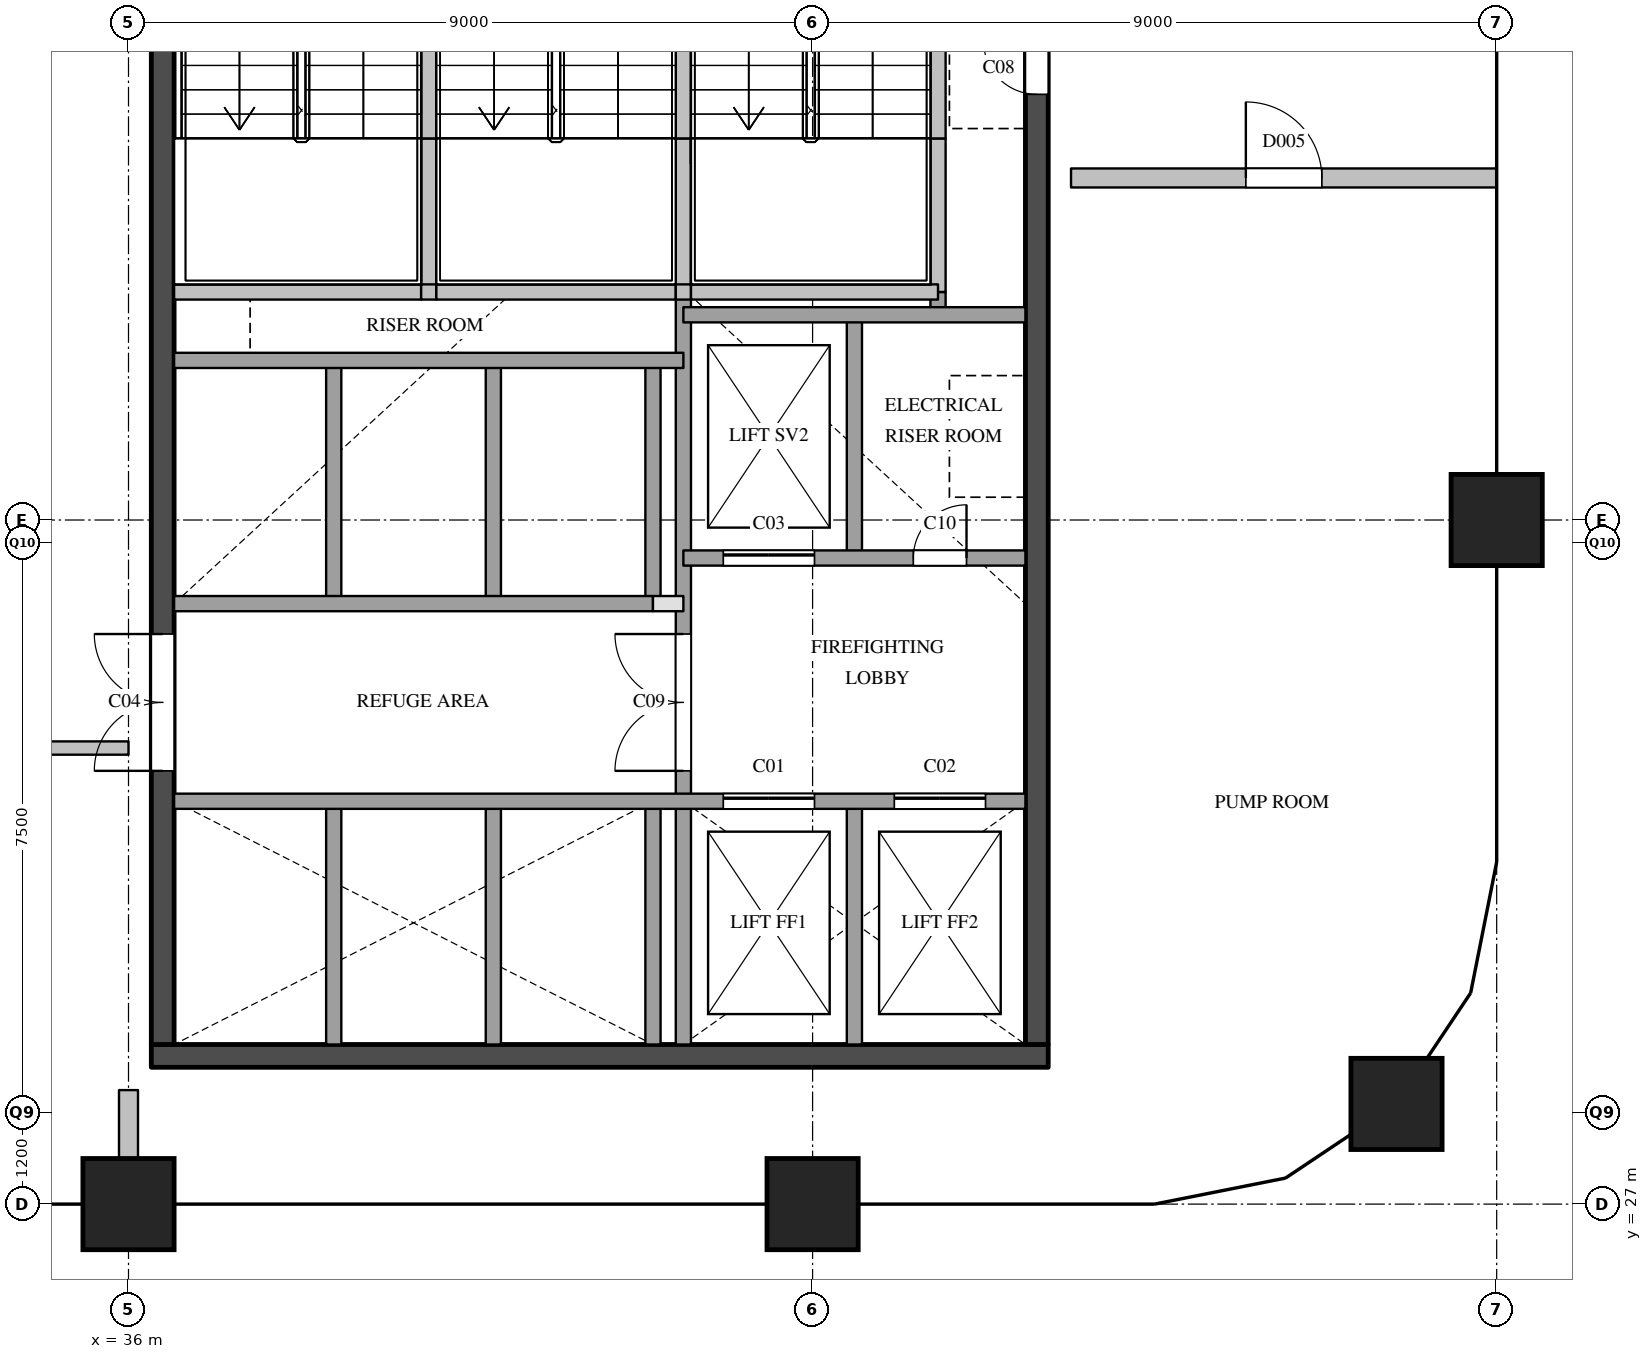
"""IFC4 building model, lengths in metres.
Left out: names, types, materials, properties, quantities, classifications, styles, units other than length and angle.
Written with IfcOpenShell. Run it as: python <this file> out.ifc"""

import sys

from ifc_helpers import new_model, si_unit, direction, frame, frame_2d, origin, origin_2d, place, context, subcontext, project, spatial, rectangle, extrude, element, fill, save


model = new_model("IFC4")
c1 = context("Model", 3, precision=1e-05, world=origin(), true_north=direction((0.0, 1.0)))
c2 = subcontext(c1, "Body", "Model", "MODEL_VIEW")
j1 = project(units=[si_unit("LENGTHUNIT", "METRE"), si_unit("PLANEANGLEUNIT", "RADIAN")], contexts=[c1])
p1 = place(None, origin())
s1 = spatial("IfcSite", under=j1, at=p1, CompositionType="ELEMENT")
p2 = place(p1, origin())
s2 = spatial("IfcBuilding", under=s1, at=p2, CompositionType="ELEMENT")
p3 = place(p2, frame((0.0, 0.0, 295.2)))
s3 = spatial("IfcBuildingStorey", under=s2, at=p3, CompositionType="ELEMENT", Elevation=295.2)
for number, where, z_axis, x_axis in (
    (1, (36.0, 27.0, 0.0), (0.0, 0.0, 1.0), (1.0, 0.0, 0.0)),
    (2, (45.0, 27.0, 0.0), (0.0, 0.0, 1.0), (1.0, 0.0, 0.0)),
    (3, (52.682, 28.318, 0.0), (0.0, 0.0, 1.0), (1.0, 0.0, 0.0)),
    (4, (54.0, 36.0, 0.0), (0.0, 0.0, 1.0), (1.0, 0.0, 0.0)),
):
    element("IfcColumn", number, at=place(p3, frame(where, z_axis=z_axis, x_axis=x_axis)), inside=s3, PredefinedType="COLUMN", context=c2, shape_type="SweptSolid", body=[
        extrude(rectangle(XDim=1.2, YDim=1.2, at=origin_2d()), origin(), (0.0, 0.0, 1.0), 6.0),
    ])
p4 = place(p3, frame((36.3, 28.95, 0.0), z_axis=(0.0, 0.0, 1.0), x_axis=(1.0, 0.0, 0.0)))
e5 = element("IfcWall", 5, at=p4, inside=s3, PredefinedType="SHEAR", context=c2, shape_type="SweptSolid", body=[
    extrude(rectangle(XDim=11.8, YDim=0.3, at=frame_2d((5.9, 0.0))), origin(), (0.0, 0.0, 1.0), 5.7),
])
p5 = place(p3, frame((36.45, 29.1, 0.0), z_axis=(0.0, 0.0, 1.0), x_axis=(0.0, 1.0, 0.0)))
e6 = element("IfcWall", 6, at=p5, inside=s3, PredefinedType="SHEAR", context=c2, shape_type="SweptSolid", body=[
    extrude(rectangle(XDim=20.3, YDim=0.3, at=frame_2d((10.15, 0.0))), origin(), (0.0, 0.0, 1.0), 5.7),
])
p6 = place(p5, frame((3.6, 0.0, 0.0)))
e7 = element("IfcOpeningElement", 7, at=p6, cuts=e6, PredefinedType="OPENING", context=c2, shape_type="SweptSolid", body=[
    extrude(rectangle(XDim=1.8, YDim=2.1, at=frame_2d((0.9, 1.05))), frame((0.0, 0.16, 0.0), z_axis=(0.0, -1.0, 0.0), x_axis=(1.0, 0.0, 0.0)), (0.0, 0.0, 1.0), 0.32),
])
p7 = place(p5, frame((16.4, 0.0, 0.0)))
e8 = element("IfcOpeningElement", 8, at=p7, cuts=e6, PredefinedType="OPENING", context=c2, shape_type="SweptSolid", body=[
    extrude(rectangle(XDim=1.0, YDim=2.1, at=frame_2d((0.5, 1.05))), frame((0.0, 0.16, 0.0), z_axis=(0.0, -1.0, 0.0), x_axis=(1.0, 0.0, 0.0)), (0.0, 0.0, 1.0), 0.32),
])
p8 = place(p3, frame((47.95, 29.1, 0.0), z_axis=(0.0, 0.0, 1.0), x_axis=(0.0, 1.0, 0.0)))
e9 = element("IfcWall", 9, at=p8, inside=s3, PredefinedType="SHEAR", context=c2, shape_type="SweptSolid", body=[
    extrude(rectangle(XDim=20.3, YDim=0.3, at=frame_2d((10.15, 0.0))), origin(), (0.0, 0.0, 1.0), 5.7),
])
p9 = place(p8, frame((12.5, 0.0, 0.0)))
e10 = element("IfcOpeningElement", 10, at=p9, cuts=e9, PredefinedType="OPENING", context=c2, shape_type="SweptSolid", body=[
    extrude(rectangle(XDim=0.7, YDim=2.1, at=frame_2d((0.35, 1.05))), frame((0.0, 0.16, 0.0), z_axis=(0.0, -1.0, 0.0), x_axis=(1.0, 0.0, 0.0)), (0.0, 0.0, 1.0), 0.32),
])
p10 = place(p3, frame((38.7, 29.1, 0.0), z_axis=(0.0, 0.0, 1.0), x_axis=(0.0, 1.0, 0.0)))
e11 = element("IfcWall", 11, at=p10, inside=s3, PredefinedType="SOLIDWALL", context=c2, shape_type="SweptSolid", body=[
    extrude(rectangle(XDim=3.2, YDim=0.2, at=frame_2d((1.6, 0.0))), origin(), (0.0, 0.0, 1.0), 5.7),
])
p11 = place(p3, frame((38.7, 34.9, 0.0), z_axis=(0.0, 0.0, 1.0), x_axis=(0.0, 1.0, 0.0)))
e12 = element("IfcWall", 12, at=p11, inside=s3, PredefinedType="SOLIDWALL", context=c2, shape_type="SweptSolid", body=[
    extrude(rectangle(XDim=3.2, YDim=0.2, at=frame_2d((1.6, 0.0))), origin(), (0.0, 0.0, 1.0), 5.7),
])
p12 = place(p3, frame((39.95, 39.0, 0.0), z_axis=(0.0, 0.0, 1.0), x_axis=(0.0, 1.0, 0.0)))
e13 = element("IfcWall", 13, at=p12, inside=s3, PredefinedType="SOLIDWALL", context=c2, shape_type="SweptSolid", body=[
    extrude(rectangle(XDim=2.02, YDim=0.2, at=frame_2d((1.01, 0.0))), origin(), (0.0, 0.0, 1.0), 5.7),
])
p13 = place(p3, frame((39.95, 41.02, 0.0), z_axis=(0.0, 0.0, 1.0), x_axis=(0.0, 1.0, 0.0)))
e14 = element("IfcWall", 14, at=p13, inside=s3, PredefinedType="SOLIDWALL", context=c2, shape_type="SweptSolid", body=[
    extrude(rectangle(XDim=2.56, YDim=0.2, at=frame_2d((1.28, 0.0))), origin(), (0.0, 0.0, 1.0), 5.7),
])
p14 = place(p3, frame((40.8, 29.1, 0.0), z_axis=(0.0, 0.0, 1.0), x_axis=(0.0, 1.0, 0.0)))
e15 = element("IfcWall", 15, at=p14, inside=s3, PredefinedType="SOLIDWALL", context=c2, shape_type="SweptSolid", body=[
    extrude(rectangle(XDim=3.2, YDim=0.2, at=frame_2d((1.6, 0.0))), origin(), (0.0, 0.0, 1.0), 5.7),
])
p15 = place(p3, frame((40.8, 34.9, 0.0), z_axis=(0.0, 0.0, 1.0), x_axis=(0.0, 1.0, 0.0)))
e16 = element("IfcWall", 16, at=p15, inside=s3, PredefinedType="SOLIDWALL", context=c2, shape_type="SweptSolid", body=[
    extrude(rectangle(XDim=3.2, YDim=0.2, at=frame_2d((1.6, 0.0))), origin(), (0.0, 0.0, 1.0), 5.7),
])
p16 = place(p3, frame((42.9, 29.1, 0.0), z_axis=(0.0, 0.0, 1.0), x_axis=(0.0, 1.0, 0.0)))
e17 = element("IfcWall", 17, at=p16, inside=s3, PredefinedType="SOLIDWALL", context=c2, shape_type="SweptSolid", body=[
    extrude(rectangle(XDim=3.2, YDim=0.2, at=frame_2d((1.6, 0.0))), origin(), (0.0, 0.0, 1.0), 5.7),
])
p17 = place(p3, frame((42.9, 34.9, 0.0), z_axis=(0.0, 0.0, 1.0), x_axis=(0.0, 1.0, 0.0)))
e18 = element("IfcWall", 18, at=p17, inside=s3, PredefinedType="SOLIDWALL", context=c2, shape_type="SweptSolid", body=[
    extrude(rectangle(XDim=3.2, YDim=0.2, at=frame_2d((1.6, 0.0))), origin(), (0.0, 0.0, 1.0), 5.7),
])
p18 = place(p3, frame((43.3, 29.1, 0.0), z_axis=(0.0, 0.0, 1.0), x_axis=(0.0, 1.0, 0.0)))
e19 = element("IfcWall", 19, at=p18, inside=s3, PredefinedType="SOLIDWALL", context=c2, shape_type="SweptSolid", body=[
    extrude(rectangle(XDim=9.9, YDim=0.2, at=frame_2d((4.95, 0.0))), origin(), (0.0, 0.0, 1.0), 5.7),
])
p19 = place(p18, frame((3.6, 0.0, 0.0)))
e20 = element("IfcOpeningElement", 20, at=p19, cuts=e19, PredefinedType="OPENING", context=c2, shape_type="SweptSolid", body=[
    extrude(rectangle(XDim=1.8, YDim=2.1, at=frame_2d((0.9, 1.05))), frame((0.0, 0.11, 0.0), z_axis=(0.0, -1.0, 0.0), x_axis=(1.0, 0.0, 0.0)), (0.0, 0.0, 1.0), 0.22),
])
p20 = place(p3, frame((43.3, 39.0, 0.0), z_axis=(0.0, 0.0, 1.0), x_axis=(0.0, 1.0, 0.0)))
e21 = element("IfcWall", 21, at=p20, inside=s3, PredefinedType="SOLIDWALL", context=c2, shape_type="SweptSolid", body=[
    extrude(rectangle(XDim=2.02, YDim=0.2, at=frame_2d((1.01, 0.0))), origin(), (0.0, 0.0, 1.0), 5.7),
])
p21 = place(p3, frame((43.3, 41.02, 0.0), z_axis=(0.0, 0.0, 1.0), x_axis=(0.0, 1.0, 0.0)))
e22 = element("IfcWall", 22, at=p21, inside=s3, PredefinedType="SOLIDWALL", context=c2, shape_type="SweptSolid", body=[
    extrude(rectangle(XDim=2.56, YDim=0.2, at=frame_2d((1.28, 0.0))), origin(), (0.0, 0.0, 1.0), 5.7),
])
for number, where, z_axis, x_axis in (
    (23, (45.55, 29.1, 0.0), (0.0, 0.0, 1.0), (0.0, 1.0, 0.0)),
    (24, (45.55, 35.5, 0.0), (0.0, 0.0, 1.0), (0.0, 1.0, 0.0)),
):
    element("IfcWall", number, at=place(p3, frame(where, z_axis=z_axis, x_axis=x_axis)), inside=s3, PredefinedType="SOLIDWALL", context=c2, shape_type="SweptSolid", body=[
        extrude(rectangle(XDim=3.2, YDim=0.2, at=frame_2d((1.6, 0.0))), origin(), (0.0, 0.0, 1.0), 5.7),
    ])
p22 = place(p3, frame((46.65, 38.7, 0.0), z_axis=(0.0, 0.0, 1.0), x_axis=(0.0, 1.0, 0.0)))
e25 = element("IfcWall", 25, at=p22, inside=s3, PredefinedType="SOLIDWALL", context=c2, shape_type="SweptSolid", body=[
    extrude(rectangle(XDim=0.3, YDim=0.2, at=frame_2d((0.15, 0.0))), origin(), (0.0, 0.0, 1.0), 5.7),
])
p23 = place(p3, frame((46.65, 39.0, 0.0), z_axis=(0.0, 0.0, 1.0), x_axis=(0.0, 1.0, 0.0)))
e26 = element("IfcWall", 26, at=p23, inside=s3, PredefinedType="SOLIDWALL", context=c2, shape_type="SweptSolid", body=[
    extrude(rectangle(XDim=2.02, YDim=0.2, at=frame_2d((1.01, 0.0))), origin(), (0.0, 0.0, 1.0), 5.7),
])
p24 = place(p3, frame((46.65, 41.02, 0.0), z_axis=(0.0, 0.0, 1.0), x_axis=(0.0, 1.0, 0.0)))
e27 = element("IfcWall", 27, at=p24, inside=s3, PredefinedType="SOLIDWALL", context=c2, shape_type="SweptSolid", body=[
    extrude(rectangle(XDim=2.56, YDim=0.2, at=frame_2d((1.28, 0.0))), origin(), (0.0, 0.0, 1.0), 5.7),
])
p25 = place(p3, frame((36.6, 32.3, 0.0), z_axis=(0.0, 0.0, 1.0), x_axis=(1.0, 0.0, 0.0)))
e28 = element("IfcWall", 28, at=p25, inside=s3, PredefinedType="SOLIDWALL", context=c2, shape_type="SweptSolid", body=[
    extrude(rectangle(XDim=11.2, YDim=0.2, at=frame_2d((5.6, 0.0))), origin(), (0.0, 0.0, 1.0), 5.7),
])
p26 = place(p25, frame((7.225, 0.0, 0.0)))
e29 = element("IfcOpeningElement", 29, at=p26, cuts=e28, PredefinedType="OPENING", context=c2, shape_type="SweptSolid", body=[
    extrude(rectangle(XDim=1.2, YDim=2.1, at=frame_2d((0.6, 1.05))), frame((0.0, 0.11, 0.0), z_axis=(0.0, -1.0, 0.0), x_axis=(1.0, 0.0, 0.0)), (0.0, 0.0, 1.0), 0.22),
])
p27 = place(p25, frame((9.475, 0.0, 0.0)))
e30 = element("IfcOpeningElement", 30, at=p27, cuts=e28, PredefinedType="OPENING", context=c2, shape_type="SweptSolid", body=[
    extrude(rectangle(XDim=1.2, YDim=2.1, at=frame_2d((0.6, 1.05))), frame((0.0, 0.11, 0.0), z_axis=(0.0, -1.0, 0.0), x_axis=(1.0, 0.0, 0.0)), (0.0, 0.0, 1.0), 0.22),
])
p28 = place(p3, frame((42.9, 34.9, 0.0), z_axis=(0.0, 0.0, 1.0), x_axis=(1.0, 0.0, 0.0)))
e31 = element("IfcWall", 31, at=p28, inside=s3, PredefinedType="PARTITIONING", context=c2, shape_type="SweptSolid", body=[
    extrude(rectangle(XDim=0.4, YDim=0.2, at=frame_2d((0.2, 0.0))), origin(), (0.0, 0.0, 1.0), 5.7),
])
p29 = place(p3, frame((36.6, 34.9, 0.0), z_axis=(0.0, 0.0, 1.0), x_axis=(1.0, 0.0, 0.0)))
e32 = element("IfcWall", 32, at=p29, inside=s3, PredefinedType="SOLIDWALL", context=c2, shape_type="SweptSolid", body=[
    extrude(rectangle(XDim=6.3, YDim=0.2, at=frame_2d((3.15, 0.0))), origin(), (0.0, 0.0, 1.0), 5.7),
])
p30 = place(p3, frame((43.3, 35.5, 0.0), z_axis=(0.0, 0.0, 1.0), x_axis=(1.0, 0.0, 0.0)))
e33 = element("IfcWall", 33, at=p30, inside=s3, PredefinedType="SOLIDWALL", context=c2, shape_type="SweptSolid", body=[
    extrude(rectangle(XDim=4.5, YDim=0.2, at=frame_2d((2.25, 0.0))), origin(), (0.0, 0.0, 1.0), 5.7),
])
p31 = place(p30, frame((0.525, 0.0, 0.0)))
e34 = element("IfcOpeningElement", 34, at=p31, cuts=e33, PredefinedType="OPENING", context=c2, shape_type="SweptSolid", body=[
    extrude(rectangle(XDim=1.2, YDim=2.1, at=frame_2d((0.6, 1.05))), frame((0.0, 0.11, 0.0), z_axis=(0.0, -1.0, 0.0), x_axis=(1.0, 0.0, 0.0)), (0.0, 0.0, 1.0), 0.22),
])
p32 = place(p30, frame((3.025, 0.0, 0.0)))
e35 = element("IfcOpeningElement", 35, at=p32, cuts=e33, PredefinedType="OPENING", context=c2, shape_type="SweptSolid", body=[
    extrude(rectangle(XDim=0.7, YDim=2.1, at=frame_2d((0.35, 1.05))), frame((0.0, 0.11, 0.0), z_axis=(0.0, -1.0, 0.0), x_axis=(1.0, 0.0, 0.0)), (0.0, 0.0, 1.0), 0.22),
])
p33 = place(p3, frame((36.6, 38.1, 0.0), z_axis=(0.0, 0.0, 1.0), x_axis=(1.0, 0.0, 0.0)))
e36 = element("IfcWall", 36, at=p33, inside=s3, PredefinedType="SOLIDWALL", context=c2, shape_type="SweptSolid", body=[
    extrude(rectangle(XDim=6.7, YDim=0.2, at=frame_2d((3.35, 0.0))), origin(), (0.0, 0.0, 1.0), 5.7),
])
p34 = place(p3, frame((43.3, 38.7, 0.0), z_axis=(0.0, 0.0, 1.0), x_axis=(1.0, 0.0, 0.0)))
e37 = element("IfcWall", 37, at=p34, inside=s3, PredefinedType="SOLIDWALL", context=c2, shape_type="SweptSolid", body=[
    extrude(rectangle(XDim=4.5, YDim=0.2, at=frame_2d((2.25, 0.0))), origin(), (0.0, 0.0, 1.0), 5.7),
])
p35 = place(p3, frame((36.6, 39.0, 0.0), z_axis=(0.0, 0.0, 1.0), x_axis=(1.0, 0.0, 0.0)))
e38 = element("IfcWall", 38, at=p35, inside=s3, PredefinedType="SOLIDWALL", context=c2, shape_type="SweptSolid", body=[
    extrude(rectangle(XDim=3.25, YDim=0.2, at=frame_2d((1.625, 0.0))), origin(), (0.0, 0.0, 1.0), 5.7),
])
p36 = place(p3, frame((39.85, 39.0, 0.0), z_axis=(0.0, 0.0, 1.0), x_axis=(1.0, 0.0, 0.0)))
e39 = element("IfcWall", 39, at=p36, inside=s3, PredefinedType="SOLIDWALL", context=c2, shape_type="SweptSolid", body=[
    extrude(rectangle(XDim=0.2, YDim=0.2, at=frame_2d((0.1, 0.0))), origin(), (0.0, 0.0, 1.0), 5.7),
])
p37 = place(p3, frame((40.05, 39.0, 0.0), z_axis=(0.0, 0.0, 1.0), x_axis=(1.0, 0.0, 0.0)))
e40 = element("IfcWall", 40, at=p37, inside=s3, PredefinedType="SOLIDWALL", context=c2, shape_type="SweptSolid", body=[
    extrude(rectangle(XDim=3.15, YDim=0.2, at=frame_2d((1.575, 0.0))), origin(), (0.0, 0.0, 1.0), 5.7),
])
p38 = place(p3, frame((43.2, 39.0, 0.0), z_axis=(0.0, 0.0, 1.0), x_axis=(1.0, 0.0, 0.0)))
e41 = element("IfcWall", 41, at=p38, inside=s3, PredefinedType="SOLIDWALL", context=c2, shape_type="SweptSolid", body=[
    extrude(rectangle(XDim=0.2, YDim=0.2, at=frame_2d((0.1, 0.0))), origin(), (0.0, 0.0, 1.0), 5.7),
])
p39 = place(p3, frame((43.4, 39.0, 0.0), z_axis=(0.0, 0.0, 1.0), x_axis=(1.0, 0.0, 0.0)))
e42 = element("IfcWall", 42, at=p39, inside=s3, PredefinedType="SOLIDWALL", context=c2, shape_type="SweptSolid", body=[
    extrude(rectangle(XDim=3.25, YDim=0.2, at=frame_2d((1.625, 0.0))), origin(), (0.0, 0.0, 1.0), 5.7),
])
p40 = place(p3, frame((24.0, 33.0, 0.0), z_axis=(0.0, 0.0, 1.0), x_axis=(1.0, 0.0, 0.0)))
e43 = element("IfcWall", 43, at=p40, inside=s3, PredefinedType="PARTITIONING", context=c2, shape_type="SweptSolid", body=[
    extrude(rectangle(XDim=12.0, YDim=0.175, at=frame_2d((6.0, 0.0))), origin(), (0.0, 0.0, 1.0), 5.7),
])
p41 = place(p40, frame((5.5, 0.0, 0.0)))
e44 = element("IfcOpeningElement", 44, at=p41, cuts=e43, PredefinedType="OPENING", context=c2, shape_type="SweptSolid", body=[
    extrude(rectangle(XDim=1.0, YDim=2.1, at=frame_2d((0.5, 1.05))), frame((0.0, 0.097, 0.0), z_axis=(0.0, -1.0, 0.0), x_axis=(1.0, 0.0, 0.0)), (0.0, 0.0, 1.0), 0.195),
])
p42 = place(p3, frame((48.4, 40.5, 0.0), z_axis=(0.0, 0.0, 1.0), x_axis=(1.0, 0.0, 0.0)))
e45 = element("IfcWall", 45, at=p42, inside=s3, PredefinedType="PARTITIONING", context=c2, shape_type="SweptSolid", body=[
    extrude(rectangle(XDim=5.6, YDim=0.25, at=frame_2d((2.8, 0.0))), origin(), (0.0, 0.0, 1.0), 5.7),
])
p43 = place(p42, frame((2.3, 0.0, 0.0)))
e46 = element("IfcOpeningElement", 46, at=p43, cuts=e45, PredefinedType="OPENING", context=c2, shape_type="SweptSolid", body=[
    extrude(rectangle(XDim=1.0, YDim=2.1, at=frame_2d((0.5, 1.05))), frame((0.0, 0.135, 0.0), z_axis=(0.0, -1.0, 0.0), x_axis=(1.0, 0.0, 0.0)), (0.0, 0.0, 1.0), 0.27),
])
p44 = place(p3, frame((36.0, 27.0, 0.0), z_axis=(0.0, 0.0, 1.0), x_axis=(0.0, 1.0, 0.0)))
e47 = element("IfcWall", 47, at=p44, inside=s3, PredefinedType="PARTITIONING", context=c2, shape_type="SweptSolid", body=[
    extrude(rectangle(XDim=1.5, YDim=0.25, at=frame_2d((0.75, 0.0))), origin(), (0.0, 0.0, 1.0), 5.7),
])
p45 = place(p26, origin())
e48 = element("IfcDoor", 48, at=p45, inside=s3, OperationType="SLIDING_TO_LEFT", PredefinedType="DOOR", context=c2, shape_type="SweptSolid", body=[
    extrude(rectangle(XDim=1.2, YDim=2.1, at=frame_2d((0.6, 1.05))), frame((0.0, 0.025, 0.0), z_axis=(0.0, -1.0, 0.0), x_axis=(1.0, 0.0, 0.0)), (0.0, 0.0, 1.0), 0.05),
])
fill(e29, e48)
p46 = place(p27, origin())
e49 = element("IfcDoor", 49, at=p46, inside=s3, OperationType="SLIDING_TO_LEFT", PredefinedType="DOOR", context=c2, shape_type="SweptSolid", body=[
    extrude(rectangle(XDim=1.2, YDim=2.1, at=frame_2d((0.6, 1.05))), frame((0.0, 0.025, 0.0), z_axis=(0.0, -1.0, 0.0), x_axis=(1.0, 0.0, 0.0)), (0.0, 0.0, 1.0), 0.05),
])
fill(e30, e49)
p47 = place(p31, origin())
e50 = element("IfcDoor", 50, at=p47, inside=s3, OperationType="SLIDING_TO_LEFT", PredefinedType="DOOR", context=c2, shape_type="SweptSolid", body=[
    extrude(rectangle(XDim=1.2, YDim=2.1, at=frame_2d((0.6, 1.05))), frame((0.0, 0.025, 0.0), z_axis=(0.0, -1.0, 0.0), x_axis=(1.0, 0.0, 0.0)), (0.0, 0.0, 1.0), 0.05),
])
fill(e34, e50)
p48 = place(p6, origin())
e51 = element("IfcDoor", 51, at=p48, inside=s3, OperationType="DOUBLE_DOOR_SINGLE_SWING", PredefinedType="DOOR", context=c2, shape_type="SweptSolid", body=[
    extrude(rectangle(XDim=1.8, YDim=2.1, at=frame_2d((0.9, 1.05))), frame((0.0, 0.025, 0.0), z_axis=(0.0, -1.0, 0.0), x_axis=(1.0, 0.0, 0.0)), (0.0, 0.0, 1.0), 0.05),
])
fill(e7, e51)
p49 = place(p9, origin())
e52 = element("IfcDoor", 52, at=p49, inside=s3, OperationType="SINGLE_SWING_RIGHT", PredefinedType="DOOR", context=c2, shape_type="SweptSolid", body=[
    extrude(rectangle(XDim=0.7, YDim=2.1, at=frame_2d((0.35, 1.05))), frame((0.0, 0.025, 0.0), z_axis=(0.0, -1.0, 0.0), x_axis=(1.0, 0.0, 0.0)), (0.0, 0.0, 1.0), 0.05),
])
fill(e10, e52)
p50 = place(p19, origin())
e53 = element("IfcDoor", 53, at=p50, inside=s3, OperationType="DOUBLE_DOOR_SINGLE_SWING", PredefinedType="DOOR", context=c2, shape_type="SweptSolid", body=[
    extrude(rectangle(XDim=1.8, YDim=2.1, at=frame_2d((0.9, 1.05))), frame((0.0, 0.025, 0.0), z_axis=(0.0, -1.0, 0.0), x_axis=(1.0, 0.0, 0.0)), (0.0, 0.0, 1.0), 0.05),
])
fill(e20, e53)
p51 = place(p32, origin())
e54 = element("IfcDoor", 54, at=p51, inside=s3, OperationType="SINGLE_SWING_RIGHT", PredefinedType="DOOR", context=c2, shape_type="SweptSolid", body=[
    extrude(rectangle(XDim=0.7, YDim=2.1, at=frame_2d((0.35, 1.05))), frame((0.0, 0.025, 0.0), z_axis=(0.0, -1.0, 0.0), x_axis=(1.0, 0.0, 0.0)), (0.0, 0.0, 1.0), 0.05),
])
fill(e35, e54)
p52 = place(p43, origin())
e55 = element("IfcDoor", 55, at=p52, inside=s3, OperationType="SINGLE_SWING_LEFT", PredefinedType="DOOR", context=c2, shape_type="SweptSolid", body=[
    extrude(rectangle(XDim=1.0, YDim=2.1, at=frame_2d((0.5, 1.05))), frame((0.0, 0.025, 0.0), z_axis=(0.0, -1.0, 0.0), x_axis=(1.0, 0.0, 0.0)), (0.0, 0.0, 1.0), 0.05),
])
fill(e46, e55)
save(model, sys.argv[1])
